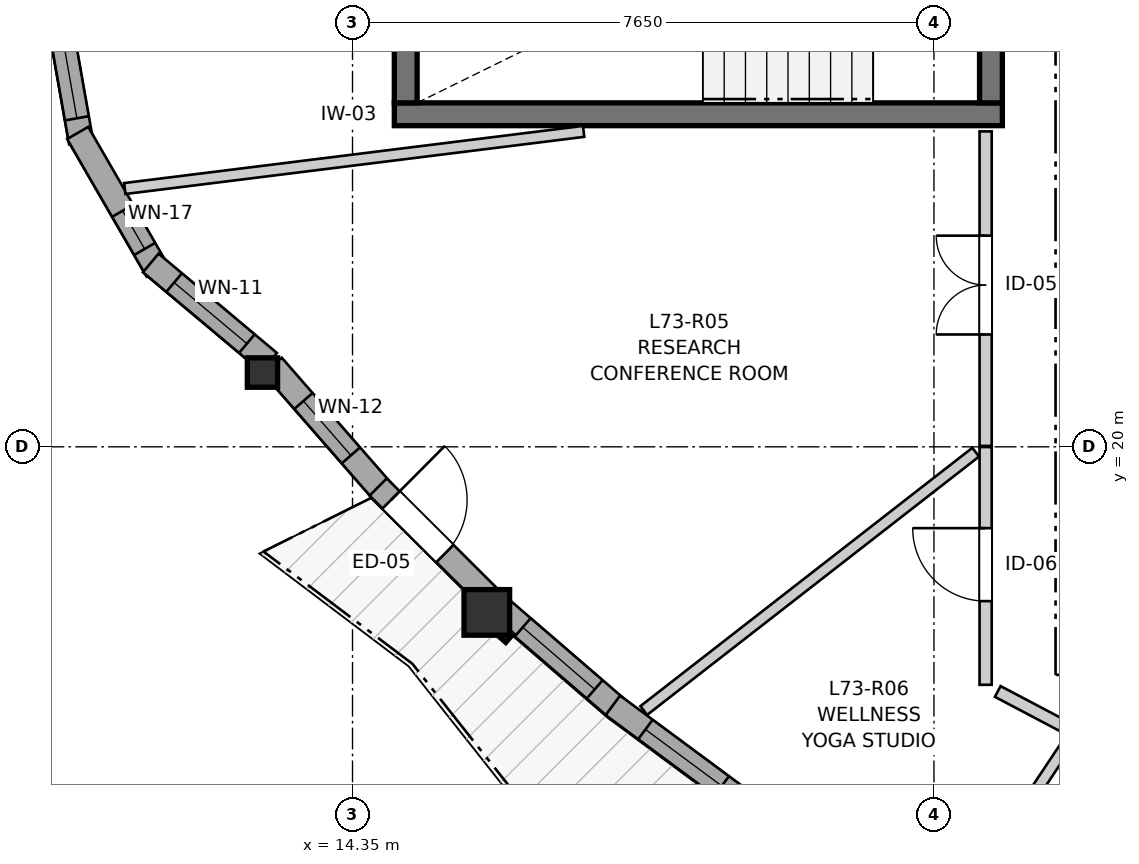
"""IFC4 building model, lengths in metres.
Left out: names, types, materials, properties, quantities, classifications, styles, units other than length and angle.
Written with IfcOpenShell. Run it as: python <this file> out.ifc"""

import sys

from ifc_helpers import new_model, si_unit, direction, frame, frame_2d, origin, origin_2d, place, context, subcontext, project, spatial, rectangle, i_section, extrude, source, transform, mapped, element, fill, save


model = new_model("IFC4")
c1 = context("Model", 3, precision=1e-05, world=origin(), true_north=direction((0.0, 1.0)))
c2 = subcontext(c1, "Body", "Model", "MODEL_VIEW")
j1 = project(units=[si_unit("LENGTHUNIT", "METRE"), si_unit("PLANEANGLEUNIT", "RADIAN")], contexts=[c1])
p1 = place(None, origin())
s1 = spatial("IfcSite", under=j1, at=p1, CompositionType="ELEMENT")
p2 = place(p1, origin())
s2 = spatial("IfcBuilding", under=s1, at=p2, CompositionType="ELEMENT")
p3 = place(p2, frame((0.0, 0.0, 243.6)))
s3 = spatial("IfcBuildingStorey", under=s2, at=p3, CompositionType="ELEMENT", Elevation=243.6)
p4 = place(p3, frame((14.9, 24.375, 0.0), z_axis=(0.0, 0.0, 1.0), x_axis=(1.0, 0.0, 0.0)))
e1 = element("IfcWall", 1, at=p4, inside=s3, PredefinedType="SHEAR", context=c2, shape_type="SweptSolid", body=[
    extrude(rectangle(XDim=8.0, YDim=0.3, at=frame_2d((4.0, 0.0))), origin(), (0.0, 0.0, 1.0), 2.96),
])
p5 = place(p3, frame((15.05, 27.475, 0.0), z_axis=(0.0, 0.0, 1.0), x_axis=(0.0, -1.0, 0.0)))
e2 = element("IfcWall", 2, at=p5, inside=s3, PredefinedType="SHEAR", context=c2, shape_type="SweptSolid", body=[
    extrude(rectangle(XDim=2.95, YDim=0.3, at=frame_2d((1.475, 0.0))), origin(), (0.0, 0.0, 1.0), 2.96),
])
p6 = place(p3, frame((22.75, 24.525, 0.0), z_axis=(0.0, 0.0, 1.0), x_axis=(0.0, 1.0, 0.0)))
e3 = element("IfcWall", 3, at=p6, inside=s3, PredefinedType="SHEAR", context=c2, shape_type="SweptSolid", body=[
    extrude(rectangle(XDim=2.95, YDim=0.3, at=frame_2d((1.475, 0.0))), origin(), (0.0, 0.0, 1.0), 2.96),
])
p7 = place(p6, frame((0.985, 0.0, 0.0)))
e4 = element("IfcOpeningElement", 4, at=p7, cuts=e3, PredefinedType="OPENING", context=c2, shape_type="SweptSolid", body=[
    extrude(rectangle(XDim=0.98, YDim=2.15, at=frame_2d((0.49, 1.075))), frame((0.0, 0.16, 0.0), z_axis=(0.0, -1.0, 0.0), x_axis=(1.0, 0.0, 0.0)), (0.0, 0.0, 1.0), 0.32),
])
m1 = source(origin(), c2, "Body", "SweptSolid", [
    extrude(i_section(OverallWidth=0.398, OverallDepth=0.387, WebThickness=0.019, FlangeThickness=0.03, FilletRadius=0.015, at=origin_2d()), origin(), (0.0, 0.0, 1.0), 2.96),
])
p8 = place(p3, frame((13.165, 20.977, 0.0), z_axis=(0.0, 0.0, 1.0), x_axis=(1.0, 0.0, 0.0)))
e5 = element("IfcColumn", 5, at=p8, inside=s3, PredefinedType="PILASTER", context=c2, shape_type="MappedRepresentation", body=[
    mapped(m1, transform((0.0, 0.0, 0.0), x_axis=(1.0, 0.0, 0.0), y_axis=(0.0, 1.0, 0.0), z_axis=(0.0, 0.0, 1.0), scale=1.0)),
])
m2 = source(origin(), c2, "Body", "SweptSolid", [
    extrude(rectangle(XDim=0.6, YDim=0.6, at=origin_2d()), origin(), (0.0, 0.0, 1.0), 2.96),
])
p9 = place(p3, frame((16.117, 17.821, 0.0), z_axis=(0.0, 0.0, 1.0), x_axis=(1.0, 0.0, 0.0)))
e6 = element("IfcColumn", 6, at=p9, inside=s3, PredefinedType="COLUMN", context=c2, shape_type="MappedRepresentation", body=[
    mapped(m2, transform((0.0, 0.0, 0.0), x_axis=(1.0, 0.0, 0.0), y_axis=(0.0, 1.0, 0.0), z_axis=(0.0, 0.0, 1.0), scale=1.0)),
])
p10 = place(p3, frame((10.416, 26.065, 0.0), z_axis=(0.0, 0.0, 1.0), x_axis=(0.173672066494, -0.984803540469, 0.0)))
e7 = element("IfcWall", 7, at=p10, inside=s3, PredefinedType="SOLIDWALL", context=c2, shape_type="SweptSolid", body=[
    extrude(rectangle(XDim=2.09, YDim=0.32, at=frame_2d((1.045, 0.0))), origin(), (0.0, 0.0, 1.0), 2.58),
])
p11 = place(p10, frame((0.32, 0.0, 0.82)))
e8 = element("IfcOpeningElement", 8, at=p11, cuts=e7, PredefinedType="OPENING", context=c2, shape_type="SweptSolid", body=[
    extrude(rectangle(XDim=1.45, YDim=1.25, at=frame_2d((0.725, 0.625))), frame((0.0, 0.17, 0.0), z_axis=(0.0, -1.0, 0.0), x_axis=(1.0, 0.0, 0.0)), (0.0, 0.0, 1.0), 0.34),
])
p12 = place(p3, frame((10.734, 24.129, 0.0), z_axis=(0.0, 0.0, 1.0), x_axis=(0.499995423472, -0.866028046028, 0.0)))
e9 = element("IfcWall", 9, at=p12, inside=s3, PredefinedType="SOLIDWALL", context=c2, shape_type="SweptSolid", body=[
    extrude(rectangle(XDim=2.09, YDim=0.32, at=frame_2d((1.045, 0.0))), origin(), (0.0, 0.0, 1.0), 2.58),
])
p13 = place(p12, frame((1.182, 0.0, 0.82)))
e10 = element("IfcOpeningElement", 10, at=p13, cuts=e9, PredefinedType="OPENING", context=c2, shape_type="SweptSolid", body=[
    extrude(rectangle(XDim=0.58, YDim=1.35, at=frame_2d((0.29, 0.675))), frame((0.0, 0.17, 0.0), z_axis=(0.0, -1.0, 0.0), x_axis=(1.0, 0.0, 0.0)), (0.0, 0.0, 1.0), 0.34),
])
p14 = place(p3, frame((11.696, 22.419, 0.0), z_axis=(0.0, 0.0, 1.0), x_axis=(0.766099948115, -0.642721455608, 0.0)))
e11 = element("IfcWall", 11, at=p14, inside=s3, PredefinedType="SOLIDWALL", context=c2, shape_type="SweptSolid", body=[
    extrude(rectangle(XDim=2.032, YDim=0.32, at=frame_2d((1.016, 0.0))), origin(), (0.0, 0.0, 1.0), 2.58),
])
p15 = place(p14, frame((0.401, 0.0, 0.82)))
e12 = element("IfcOpeningElement", 12, at=p15, cuts=e11, PredefinedType="OPENING", context=c2, shape_type="SweptSolid", body=[
    extrude(rectangle(XDim=1.25, YDim=1.35, at=frame_2d((0.625, 0.675))), frame((0.0, 0.17, 0.0), z_axis=(0.0, -1.0, 0.0), x_axis=(1.0, 0.0, 0.0)), (0.0, 0.0, 1.0), 0.34),
])
p16 = place(p3, frame((13.299, 21.067, 0.0), z_axis=(0.0, 0.0, 1.0), x_axis=(0.657609731914, -0.753358772759, 0.0)))
e13 = element("IfcWall", 13, at=p16, inside=s3, PredefinedType="SOLIDWALL", context=c2, shape_type="SweptSolid", body=[
    extrude(rectangle(XDim=2.203, YDim=0.32, at=frame_2d((1.102, 0.0))), origin(), (0.0, 0.0, 1.0), 2.58),
])
p17 = place(p16, frame((0.616, 0.0, 0.82)))
e14 = element("IfcOpeningElement", 14, at=p17, cuts=e13, PredefinedType="OPENING", context=c2, shape_type="SweptSolid", body=[
    extrude(rectangle(XDim=0.95, YDim=1.35, at=frame_2d((0.475, 0.675))), frame((0.0, 0.17, 0.0), z_axis=(0.0, -1.0, 0.0), x_axis=(1.0, 0.0, 0.0)), (0.0, 0.0, 1.0), 0.34),
])
p18 = place(p3, frame((14.688, 19.471, 0.0), z_axis=(0.0, 0.0, 1.0), x_axis=(0.708392320445, -0.705818900522, 0.0)))
e15 = element("IfcWall", 15, at=p18, inside=s3, PredefinedType="SOLIDWALL", context=c2, shape_type="SweptSolid", body=[
    extrude(rectangle(XDim=2.087, YDim=0.32, at=frame_2d((1.043, 0.0))), origin(), (0.0, 0.0, 1.0), 2.58),
])
p19 = place(p18, frame((0.24, 0.0, 0.0)))
e16 = element("IfcOpeningElement", 16, at=p19, cuts=e15, PredefinedType="OPENING", context=c2, shape_type="SweptSolid", body=[
    extrude(rectangle(XDim=1.0, YDim=2.1, at=frame_2d((0.5, 1.05))), frame((0.0, 0.17, 0.0), z_axis=(0.0, -1.0, 0.0), x_axis=(1.0, 0.0, 0.0)), (0.0, 0.0, 1.0), 0.34),
])
p20 = place(p3, frame((16.29, 17.884, 0.0), z_axis=(0.0, 0.0, 1.0), x_axis=(0.757405903716, -0.652944329186, 0.0)))
e17 = element("IfcWall", 17, at=p20, inside=s3, PredefinedType="SOLIDWALL", context=c2, shape_type="SweptSolid", body=[
    extrude(rectangle(XDim=2.052, YDim=0.32, at=frame_2d((1.026, 0.0))), origin(), (0.0, 0.0, 1.0), 2.58),
])
p21 = place(p20, frame((0.396, 0.0, 0.82)))
e18 = element("IfcOpeningElement", 18, at=p21, cuts=e17, PredefinedType="OPENING", context=c2, shape_type="SweptSolid", body=[
    extrude(rectangle(XDim=1.25, YDim=1.35, at=frame_2d((0.625, 0.675))), frame((0.0, 0.17, 0.0), z_axis=(0.0, -1.0, 0.0), x_axis=(1.0, 0.0, 0.0)), (0.0, 0.0, 1.0), 0.34),
])
p22 = place(p3, frame((17.775, 16.599, 0.0), z_axis=(0.0, 0.0, 1.0), x_axis=(0.803808524664, -0.594888103493, 0.0)))
e19 = element("IfcWall", 19, at=p22, inside=s3, PredefinedType="SOLIDWALL", context=c2, shape_type="SweptSolid", body=[
    extrude(rectangle(XDim=2.099, YDim=0.32, at=frame_2d((1.049, 0.0))), origin(), (0.0, 0.0, 1.0), 2.58),
])
p23 = place(p22, frame((0.533, 0.0, 0.82)))
e20 = element("IfcOpeningElement", 20, at=p23, cuts=e19, PredefinedType="OPENING", context=c2, shape_type="SweptSolid", body=[
    extrude(rectangle(XDim=1.25, YDim=1.35, at=frame_2d((0.625, 0.675))), frame((0.0, 0.17, 0.0), z_axis=(0.0, -1.0, 0.0), x_axis=(1.0, 0.0, 0.0)), (0.0, 0.0, 1.0), 0.34),
])
p24 = place(p3, frame((22.68, 20.012, 0.0), z_axis=(0.0, 0.0, 1.0), x_axis=(0.0, 1.0, 0.0)))
e21 = element("IfcWall", 21, at=p24, inside=s3, PredefinedType="PARTITIONING", context=c2, shape_type="SweptSolid", body=[
    extrude(rectangle(XDim=4.138, YDim=0.16, at=frame_2d((2.069, 0.0))), origin(), (0.0, 0.0, 1.0), 2.96),
])
p25 = place(p24, frame((1.466, 0.0, 0.0)))
e22 = element("IfcOpeningElement", 22, at=p25, cuts=e21, PredefinedType="OPENING", context=c2, shape_type="SweptSolid", body=[
    extrude(rectangle(XDim=1.3, YDim=2.1, at=frame_2d((0.65, 1.05))), frame((0.0, 0.09, 0.0), z_axis=(0.0, -1.0, 0.0), x_axis=(1.0, 0.0, 0.0)), (0.0, 0.0, 1.0), 0.18),
])
p26 = place(p3, frame((22.68, 16.869, 0.0), z_axis=(0.0, 0.0, 1.0), x_axis=(0.0, 1.0, 0.0)))
e23 = element("IfcWall", 23, at=p26, inside=s3, PredefinedType="PARTITIONING", context=c2, shape_type="SweptSolid", body=[
    extrude(rectangle(XDim=3.128, YDim=0.16, at=frame_2d((1.564, 0.0))), origin(), (0.0, 0.0, 1.0), 2.96),
])
p27 = place(p26, frame((1.101, 0.0, 0.0)))
e24 = element("IfcOpeningElement", 24, at=p27, cuts=e23, PredefinedType="OPENING", context=c2, shape_type="SweptSolid", body=[
    extrude(rectangle(XDim=0.96, YDim=2.1, at=frame_2d((0.48, 1.05))), frame((0.0, 0.09, 0.0), z_axis=(0.0, -1.0, 0.0), x_axis=(1.0, 0.0, 0.0)), (0.0, 0.0, 1.0), 0.18),
])
p28 = place(p3, frame((11.354, 23.398, 0.0), z_axis=(0.0, 0.0, 1.0), x_axis=(0.992337032495, 0.123560567901, 0.0)))
e25 = element("IfcWall", 25, at=p28, inside=s3, PredefinedType="PARTITIONING", context=c2, shape_type="SweptSolid", body=[
    extrude(rectangle(XDim=6.084, YDim=0.145, at=frame_2d((3.042, 0.0))), origin(), (0.0, 0.0, 1.0), 2.96),
])
p29 = place(p3, frame((18.182, 16.531, 0.0), z_axis=(0.0, 0.0, 1.0), x_axis=(0.789162127136, 0.614184937209, 0.0)))
e26 = element("IfcWall", 26, at=p29, inside=s3, PredefinedType="PARTITIONING", context=c2, shape_type="SweptSolid", body=[
    extrude(rectangle(XDim=5.534, YDim=0.145, at=frame_2d((2.767, 0.0))), origin(), (0.0, 0.0, 1.0), 2.96),
])
p30 = place(p3, frame((22.281, 13.882, 0.0), z_axis=(0.0, 0.0, 1.0), x_axis=(0.554204156683, 0.832380773874, 0.0)))
e27 = element("IfcWall", 27, at=p30, inside=s3, PredefinedType="PARTITIONING", context=c2, shape_type="SweptSolid", body=[
    extrude(rectangle(XDim=2.84, YDim=0.145, at=frame_2d((1.42, 0.0))), origin(), (0.0, 0.0, 1.0), 2.96),
])
p31 = place(p3, frame((22.839, 16.781, 0.0), z_axis=(0.0, 0.0, 1.0), x_axis=(0.884533287542, -0.466477076853, 0.0)))
e28 = element("IfcWall", 28, at=p31, inside=s3, PredefinedType="PARTITIONING", context=c2, shape_type="SweptSolid", body=[
    extrude(rectangle(XDim=1.074, YDim=0.16, at=frame_2d((0.537, 0.0))), origin(), (0.0, 0.0, 1.0), 2.96),
])
m3 = source(origin(), c2, "Body", "SweptSolid", [
    extrude(rectangle(XDim=1.45, YDim=1.25, at=frame_2d((0.725, 0.625))), frame((0.0, 0.03, 0.0), z_axis=(0.0, -1.0, 0.0), x_axis=(1.0, 0.0, 0.0)), (0.0, 0.0, 1.0), 0.06),
])
p32 = place(p11, origin())
e29 = element("IfcWindow", 29, at=p32, inside=s3, PartitioningType="SINGLE_PANEL", PredefinedType="WINDOW", context=c2, shape_type="MappedRepresentation", body=[
    mapped(m3, transform((0.0, 0.0, 0.0), x_axis=(1.0, 0.0, 0.0), y_axis=(0.0, 1.0, 0.0), z_axis=(0.0, 0.0, 1.0), scale=1.0)),
])
fill(e8, e29)
m4 = source(origin(), c2, "Body", "SweptSolid", [
    extrude(rectangle(XDim=0.58, YDim=1.35, at=frame_2d((0.29, 0.675))), frame((0.0, 0.03, 0.0), z_axis=(0.0, -1.0, 0.0), x_axis=(1.0, 0.0, 0.0)), (0.0, 0.0, 1.0), 0.06),
])
p33 = place(p13, origin())
e30 = element("IfcWindow", 30, at=p33, inside=s3, PartitioningType="SINGLE_PANEL", PredefinedType="WINDOW", context=c2, shape_type="MappedRepresentation", body=[
    mapped(m4, transform((0.0, 0.0, 0.0), x_axis=(1.0, 0.0, 0.0), y_axis=(0.0, 1.0, 0.0), z_axis=(0.0, 0.0, 1.0), scale=1.0)),
])
fill(e10, e30)
m5 = source(origin(), c2, "Body", "SweptSolid", [
    extrude(rectangle(XDim=1.25, YDim=1.35, at=frame_2d((0.625, 0.675))), frame((0.0, 0.03, 0.0), z_axis=(0.0, -1.0, 0.0), x_axis=(1.0, 0.0, 0.0)), (0.0, 0.0, 1.0), 0.06),
])
p34 = place(p15, origin())
e31 = element("IfcWindow", 31, at=p34, inside=s3, PartitioningType="SINGLE_PANEL", PredefinedType="WINDOW", context=c2, shape_type="MappedRepresentation", body=[
    mapped(m5, transform((0.0, 0.0, 0.0), x_axis=(1.0, 0.0, 0.0), y_axis=(0.0, 1.0, 0.0), z_axis=(0.0, 0.0, 1.0), scale=1.0)),
])
fill(e12, e31)
m6 = source(origin(), c2, "Body", "SweptSolid", [
    extrude(rectangle(XDim=0.95, YDim=1.35, at=frame_2d((0.475, 0.675))), frame((0.0, 0.03, 0.0), z_axis=(0.0, -1.0, 0.0), x_axis=(1.0, 0.0, 0.0)), (0.0, 0.0, 1.0), 0.06),
])
p35 = place(p17, origin())
e32 = element("IfcWindow", 32, at=p35, inside=s3, PartitioningType="SINGLE_PANEL", PredefinedType="WINDOW", context=c2, shape_type="MappedRepresentation", body=[
    mapped(m6, transform((0.0, 0.0, 0.0), x_axis=(1.0, 0.0, 0.0), y_axis=(0.0, 1.0, 0.0), z_axis=(0.0, 0.0, 1.0), scale=1.0)),
])
fill(e14, e32)
p36 = place(p21, origin())
e33 = element("IfcWindow", 33, at=p36, inside=s3, PartitioningType="SINGLE_PANEL", PredefinedType="WINDOW", context=c2, shape_type="MappedRepresentation", body=[
    mapped(m5, transform((0.0, 0.0, 0.0), x_axis=(1.0, 0.0, 0.0), y_axis=(0.0, 1.0, 0.0), z_axis=(0.0, 0.0, 1.0), scale=1.0)),
])
fill(e18, e33)
p37 = place(p23, origin())
e34 = element("IfcWindow", 34, at=p37, inside=s3, PartitioningType="SINGLE_PANEL", PredefinedType="WINDOW", context=c2, shape_type="MappedRepresentation", body=[
    mapped(m5, transform((0.0, 0.0, 0.0), x_axis=(1.0, 0.0, 0.0), y_axis=(0.0, 1.0, 0.0), z_axis=(0.0, 0.0, 1.0), scale=1.0)),
])
fill(e20, e34)
m7 = source(origin(), c2, "Body", "SweptSolid", [
    extrude(rectangle(XDim=1.0, YDim=2.1, at=frame_2d((0.5, 1.05))), frame((0.0, 0.025, 0.0), z_axis=(0.0, -1.0, 0.0), x_axis=(1.0, 0.0, 0.0)), (0.0, 0.0, 1.0), 0.05),
])
p38 = place(p19, origin())
e35 = element("IfcDoor", 35, at=p38, inside=s3, OperationType="SINGLE_SWING_LEFT", PredefinedType="DOOR", context=c2, shape_type="MappedRepresentation", body=[
    mapped(m7, transform((0.0, 0.0, 0.0), x_axis=(1.0, 0.0, 0.0), y_axis=(0.0, 1.0, 0.0), z_axis=(0.0, 0.0, 1.0), scale=1.0)),
])
fill(e16, e35)
m8 = source(origin(), c2, "Body", "SweptSolid", [
    extrude(rectangle(XDim=1.3, YDim=2.1, at=frame_2d((0.65, 1.05))), frame((0.0, 0.025, 0.0), z_axis=(0.0, -1.0, 0.0), x_axis=(1.0, 0.0, 0.0)), (0.0, 0.0, 1.0), 0.05),
])
p39 = place(p25, origin())
e36 = element("IfcDoor", 36, at=p39, inside=s3, OperationType="DOUBLE_DOOR_SINGLE_SWING", PredefinedType="DOOR", context=c2, shape_type="MappedRepresentation", body=[
    mapped(m8, transform((0.0, 0.0, 0.0), x_axis=(1.0, 0.0, 0.0), y_axis=(0.0, 1.0, 0.0), z_axis=(0.0, 0.0, 1.0), scale=1.0)),
])
fill(e22, e36)
m9 = source(origin(), c2, "Body", "SweptSolid", [
    extrude(rectangle(XDim=0.96, YDim=2.1, at=frame_2d((0.48, 1.05))), frame((0.0, 0.025, 0.0), z_axis=(0.0, -1.0, 0.0), x_axis=(1.0, 0.0, 0.0)), (0.0, 0.0, 1.0), 0.05),
])
p40 = place(p27, origin())
e37 = element("IfcDoor", 37, at=p40, inside=s3, OperationType="SINGLE_SWING_RIGHT", PredefinedType="DOOR", context=c2, shape_type="MappedRepresentation", body=[
    mapped(m9, transform((0.0, 0.0, 0.0), x_axis=(1.0, 0.0, 0.0), y_axis=(0.0, 1.0, 0.0), z_axis=(0.0, 0.0, 1.0), scale=1.0)),
])
fill(e24, e37)
save(model, sys.argv[1])
